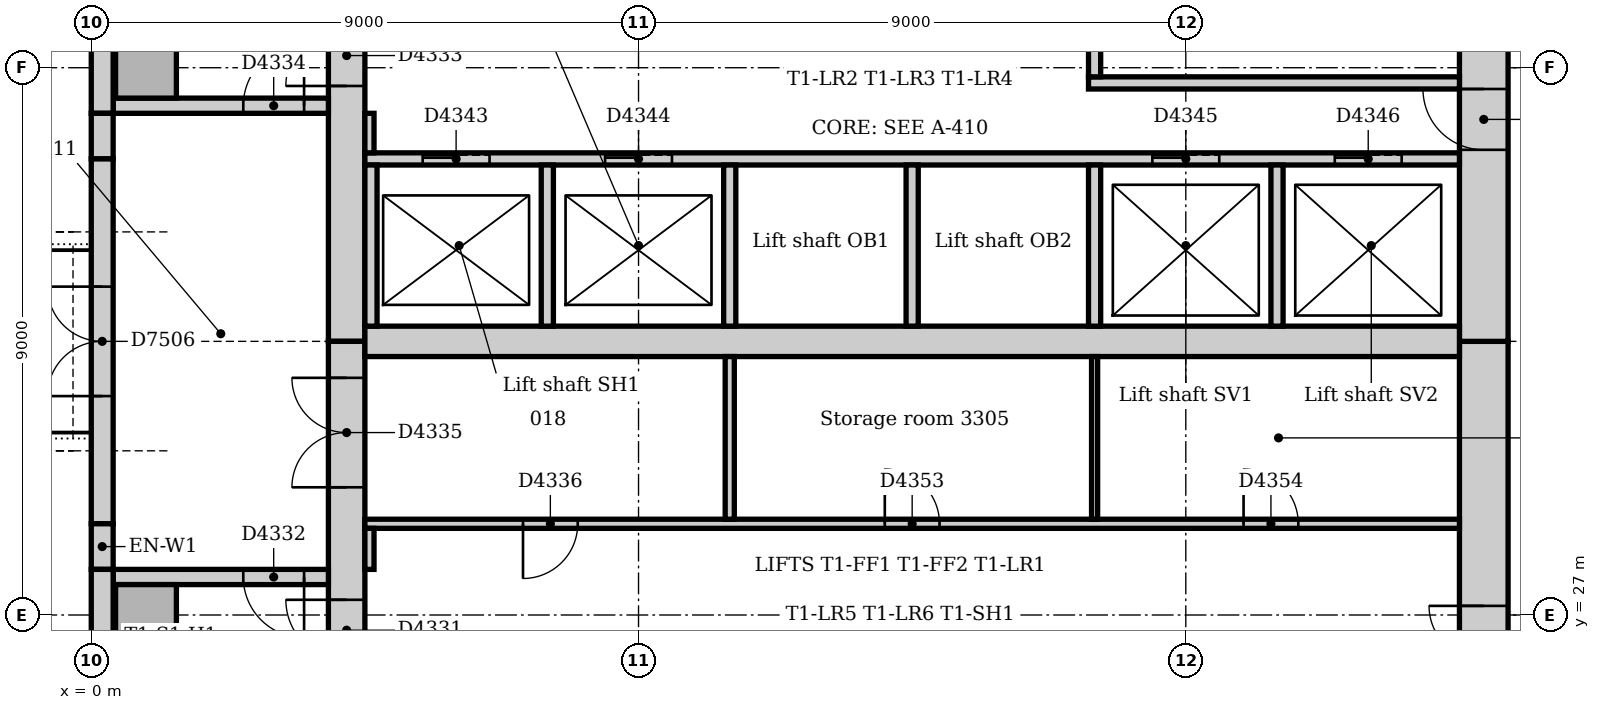
"""IFC4 building model, lengths in metres.
Left out: names, types, materials, properties, quantities, classifications, styles, units other than length and angle.
Written with IfcOpenShell. Run it as: python <this file> out.ifc"""

import sys

from ifc_helpers import new_model, si_unit, direction, frame, frame_2d, origin, origin_2d, place, context, subcontext, project, spatial, rectangle, extrude, element, fill, save


model = new_model("IFC4")
c1 = context("Model", 3, precision=1e-05, world=origin(), true_north=direction((0.0, 1.0)))
c2 = subcontext(c1, "Body", "Model", "MODEL_VIEW")
j1 = project(units=[si_unit("LENGTHUNIT", "METRE"), si_unit("PLANEANGLEUNIT", "RADIAN")], contexts=[c1])
p1 = place(None, origin())
s1 = spatial("IfcSite", under=j1, at=p1, CompositionType="ELEMENT")
p2 = place(p1, origin())
s2 = spatial("IfcBuilding", under=s1, at=p2, CompositionType="ELEMENT")
p3 = place(p2, frame((0.0, 0.0, 140.0)))
s3 = spatial("IfcBuildingStorey", under=s2, at=p3, CompositionType="ELEMENT", Elevation=140.0)
p4 = place(p3, frame((22.9, 21.0, 0.0), z_axis=(0.0, 0.0, 1.0), x_axis=(0.0, 1.0, 0.0)))
e1 = element("IfcWall", 1, at=p4, inside=s3, PredefinedType="SOLIDWALL", context=c2, shape_type="SweptSolid", body=[
    extrude(rectangle(XDim=10.5, YDim=0.8, at=frame_2d((5.25, 0.0))), origin(), (0.0, 0.0, 1.0), 4.0),
])
p5 = place(p4, frame((4.35, 0.0, 0.0)))
e2 = element("IfcOpeningElement", 2, at=p5, cuts=e1, PredefinedType="OPENING", context=c2, shape_type="SweptSolid", body=[
    extrude(rectangle(XDim=1.8, YDim=2.1, at=frame_2d((0.9, 1.05))), frame((0.0, 0.41, 0.0), z_axis=(0.0, -1.0, 0.0), x_axis=(1.0, 0.0, 0.0)), (0.0, 0.0, 1.0), 0.82),
])
p6 = place(p3, frame((22.9, 31.5, 0.0), z_axis=(0.0, 0.0, 1.0), x_axis=(0.0, 1.0, 0.0)))
e3 = element("IfcWall", 3, at=p6, inside=s3, PredefinedType="SOLIDWALL", context=c2, shape_type="SweptSolid", body=[
    extrude(rectangle(XDim=10.5, YDim=0.8, at=frame_2d((5.25, 0.0))), origin(), (0.0, 0.0, 1.0), 4.0),
])
p7 = place(p6, frame((3.15, 0.0, 0.0)))
e4 = element("IfcOpeningElement", 4, at=p7, cuts=e3, PredefinedType="OPENING", context=c2, shape_type="SweptSolid", body=[
    extrude(rectangle(XDim=1.0, YDim=2.1, at=frame_2d((0.5, 1.05))), frame((0.0, 0.41, 0.0), z_axis=(0.0, -1.0, 0.0), x_axis=(1.0, 0.0, 0.0)), (0.0, 0.0, 1.0), 0.82),
])
p8 = place(p6, frame((5.2, 0.0, 0.0)))
e5 = element("IfcOpeningElement", 5, at=p8, cuts=e3, PredefinedType="OPENING", context=c2, shape_type="SweptSolid", body=[
    extrude(rectangle(XDim=1.0, YDim=2.1, at=frame_2d((0.5, 1.05))), frame((0.0, 0.41, 0.0), z_axis=(0.0, -1.0, 0.0), x_axis=(1.0, 0.0, 0.0)), (0.0, 0.0, 1.0), 0.82),
])
p9 = place(p3, frame((4.2, 42.0, 0.0), z_axis=(0.0, 0.0, 1.0), x_axis=(0.0, -1.0, 0.0)))
e6 = element("IfcWall", 6, at=p9, inside=s3, PredefinedType="SOLIDWALL", context=c2, shape_type="SweptSolid", body=[
    extrude(rectangle(XDim=10.5, YDim=0.6, at=frame_2d((5.25, 0.0))), origin(), (0.0, 0.0, 1.0), 4.0),
])
p10 = place(p9, frame((5.3, 0.0, 0.0)))
e7 = element("IfcOpeningElement", 7, at=p10, cuts=e6, PredefinedType="OPENING", context=c2, shape_type="SweptSolid", body=[
    extrude(rectangle(XDim=1.0, YDim=2.1, at=frame_2d((0.5, 1.05))), frame((0.0, 0.31, 0.0), z_axis=(0.0, -1.0, 0.0), x_axis=(1.0, 0.0, 0.0)), (0.0, 0.0, 1.0), 0.62),
])
p11 = place(p3, frame((4.2, 31.5, 0.0), z_axis=(0.0, 0.0, 1.0), x_axis=(0.0, -1.0, 0.0)))
e8 = element("IfcWall", 8, at=p11, inside=s3, PredefinedType="SOLIDWALL", context=c2, shape_type="SweptSolid", body=[
    extrude(rectangle(XDim=10.5, YDim=0.6, at=frame_2d((5.25, 0.0))), origin(), (0.0, 0.0, 1.0), 4.0),
])
p12 = place(p11, frame((4.25, 0.0, 0.0)))
e9 = element("IfcOpeningElement", 9, at=p12, cuts=e8, PredefinedType="OPENING", context=c2, shape_type="SweptSolid", body=[
    extrude(rectangle(XDim=1.0, YDim=2.1, at=frame_2d((0.5, 1.05))), frame((0.0, 0.31, 0.0), z_axis=(0.0, -1.0, 0.0), x_axis=(1.0, 0.0, 0.0)), (0.0, 0.0, 1.0), 0.62),
])
p13 = place(p11, frame((0.6, 0.0, 0.0)))
e10 = element("IfcOpeningElement", 10, at=p13, cuts=e8, PredefinedType="OPENING", context=c2, shape_type="SweptSolid", body=[
    extrude(rectangle(XDim=1.8, YDim=2.1, at=frame_2d((0.9, 1.05))), frame((0.0, 0.31, 0.0), z_axis=(0.0, -1.0, 0.0), x_axis=(1.0, 0.0, 0.0)), (0.0, 0.0, 1.0), 0.62),
])
p14 = place(p3, frame((4.5, 31.5, 0.0), z_axis=(0.0, 0.0, 1.0), x_axis=(1.0, 0.0, 0.0)))
e11 = element("IfcWall", 11, at=p14, inside=s3, PredefinedType="SOLIDWALL", context=c2, shape_type="SweptSolid", body=[
    extrude(rectangle(XDim=18.0, YDim=0.5, at=frame_2d((9.0, 0.0))), origin(), (0.0, 0.0, 1.0), 4.0),
])
p15 = place(p3, frame((3.9, 27.625, 0.0), z_axis=(0.0, 0.0, 1.0), x_axis=(-1.0, 0.0, 0.0)))
e12 = element("IfcWall", 12, at=p15, inside=s3, PredefinedType="SOLIDWALL", context=c2, shape_type="SweptSolid", body=[
    extrude(rectangle(XDim=3.54, YDim=0.25, at=frame_2d((1.77, 0.0))), origin(), (0.0, 0.0, 1.0), 4.0),
])
p16 = place(p15, frame((0.4, 0.0, 0.0)))
e13 = element("IfcOpeningElement", 13, at=p16, cuts=e12, PredefinedType="OPENING", context=c2, shape_type="SweptSolid", body=[
    extrude(rectangle(XDim=1.0, YDim=2.1, at=frame_2d((0.5, 1.05))), frame((0.0, 0.135, 0.0), z_axis=(0.0, -1.0, 0.0), x_axis=(1.0, 0.0, 0.0)), (0.0, 0.0, 1.0), 0.27),
])
p17 = place(p3, frame((0.36, 35.375, 0.0), z_axis=(0.0, 0.0, 1.0), x_axis=(1.0, 0.0, 0.0)))
e14 = element("IfcWall", 14, at=p17, inside=s3, PredefinedType="SOLIDWALL", context=c2, shape_type="SweptSolid", body=[
    extrude(rectangle(XDim=3.54, YDim=0.25, at=frame_2d((1.77, 0.0))), origin(), (0.0, 0.0, 1.0), 4.0),
])
p18 = place(p17, frame((2.14, 0.0, 0.0)))
e15 = element("IfcOpeningElement", 15, at=p18, cuts=e14, PredefinedType="OPENING", context=c2, shape_type="SweptSolid", body=[
    extrude(rectangle(XDim=1.0, YDim=2.1, at=frame_2d((0.5, 1.05))), frame((0.0, 0.135, 0.0), z_axis=(0.0, -1.0, 0.0), x_axis=(1.0, 0.0, 0.0)), (0.0, 0.0, 1.0), 0.27),
])
for number, where, z_axis, x_axis in (
    (16, (0.9, 27.0, 0.0), (0.0, 0.0, 1.0), (1.0, 0.0, 0.0)),
    (17, (0.9, 36.0, 0.0), (0.0, 0.0, 1.0), (1.0, 0.0, 0.0)),
):
    element("IfcColumn", number, at=place(p3, frame(where, z_axis=z_axis, x_axis=x_axis)), inside=s3, PredefinedType="COLUMN", context=c2, shape_type="SweptSolid", body=[
        extrude(rectangle(XDim=1.0, YDim=1.0, at=origin_2d()), origin(), (0.0, 0.0, 1.0), 4.0),
    ])
p19 = place(p3, frame((0.18, 42.0, 0.0), z_axis=(0.0, 0.0, 1.0), x_axis=(0.0, -1.0, 0.0)))
e18 = element("IfcWall", 18, at=p19, inside=s3, PredefinedType="STANDARD", context=c2, shape_type="SweptSolid", body=[
    extrude(rectangle(XDim=6.75, YDim=0.36, at=frame_2d((3.375, 0.0))), origin(), (0.0, 0.0, 1.0), 3.7),
])
p20 = place(p3, frame((0.18, 35.25, 0.0), z_axis=(0.0, 0.0, 1.0), x_axis=(0.0, -1.0, 0.0)))
e19 = element("IfcWall", 19, at=p20, inside=s3, PredefinedType="STANDARD", context=c2, shape_type="SweptSolid", body=[
    extrude(rectangle(XDim=0.75, YDim=0.36, at=frame_2d((0.375, 0.0))), origin(), (0.0, 0.0, 1.0), 3.7),
])
p21 = place(p3, frame((0.18, 34.5, 0.0), z_axis=(0.0, 0.0, 1.0), x_axis=(0.0, -1.0, 0.0)))
e20 = element("IfcWall", 20, at=p21, inside=s3, PredefinedType="STANDARD", context=c2, shape_type="SweptSolid", body=[
    extrude(rectangle(XDim=6.0, YDim=0.36, at=frame_2d((3.0, 0.0))), origin(), (0.0, 0.0, 1.0), 3.7),
])
p22 = place(p21, frame((2.1, 0.0, 0.0)))
e21 = element("IfcOpeningElement", 21, at=p22, cuts=e20, PredefinedType="OPENING", context=c2, shape_type="SweptSolid", body=[
    extrude(rectangle(XDim=1.8, YDim=2.4, at=frame_2d((0.9, 1.2))), frame((0.0, 0.19, 0.0), z_axis=(0.0, -1.0, 0.0), x_axis=(1.0, 0.0, 0.0)), (0.0, 0.0, 1.0), 0.38),
])
p23 = place(p3, frame((0.18, 28.5, 0.0), z_axis=(0.0, 0.0, 1.0), x_axis=(0.0, -1.0, 0.0)))
e22 = element("IfcWall", 22, at=p23, inside=s3, PredefinedType="STANDARD", context=c2, shape_type="SweptSolid", body=[
    extrude(rectangle(XDim=0.75, YDim=0.36, at=frame_2d((0.375, 0.0))), origin(), (0.0, 0.0, 1.0), 3.7),
])
p24 = place(p3, frame((0.18, 27.75, 0.0), z_axis=(0.0, 0.0, 1.0), x_axis=(0.0, -1.0, 0.0)))
e23 = element("IfcWall", 23, at=p24, inside=s3, PredefinedType="STANDARD", context=c2, shape_type="SweptSolid", body=[
    extrude(rectangle(XDim=6.75, YDim=0.36, at=frame_2d((3.375, 0.0))), origin(), (0.0, 0.0, 1.0), 3.7),
])
p25 = place(p3, frame((16.4, 35.75, 0.0), z_axis=(0.0, 0.0, 1.0), x_axis=(1.0, 0.0, 0.0)))
e24 = element("IfcWall", 24, at=p25, inside=s3, PredefinedType="PARTITIONING", context=c2, shape_type="SweptSolid", body=[
    extrude(rectangle(XDim=6.1, YDim=0.2, at=frame_2d((3.05, 0.0))), origin(), (0.0, 0.0, 1.0), 3.7),
])
p26 = place(p3, frame((16.5, 35.85, 0.0), z_axis=(0.0, 0.0, 1.0), x_axis=(0.0, 1.0, 0.0)))
e25 = element("IfcWall", 25, at=p26, inside=s3, PredefinedType="PARTITIONING", context=c2, shape_type="SweptSolid", body=[
    extrude(rectangle(XDim=2.55, YDim=0.2, at=frame_2d((1.275, 0.0))), origin(), (0.0, 0.0, 1.0), 3.7),
])
p27 = place(p3, frame((4.5, 34.5, 0.0), z_axis=(0.0, 0.0, 1.0), x_axis=(1.0, 0.0, 0.0)))
e26 = element("IfcWall", 26, at=p27, inside=s3, PredefinedType="PARTITIONING", context=c2, shape_type="SweptSolid", body=[
    extrude(rectangle(XDim=18.0, YDim=0.2, at=frame_2d((9.0, 0.0))), origin(), (0.0, 0.0, 1.0), 3.7),
])
p28 = place(p27, frame((0.95, 0.0, 0.0)))
e27 = element("IfcOpeningElement", 27, at=p28, cuts=e26, PredefinedType="OPENING", context=c2, shape_type="SweptSolid", body=[
    extrude(rectangle(XDim=1.1, YDim=2.1, at=frame_2d((0.55, 1.05))), frame((0.0, 0.11, 0.0), z_axis=(0.0, -1.0, 0.0), x_axis=(1.0, 0.0, 0.0)), (0.0, 0.0, 1.0), 0.22),
])
p29 = place(p27, frame((3.95, 0.0, 0.0)))
e28 = element("IfcOpeningElement", 28, at=p29, cuts=e26, PredefinedType="OPENING", context=c2, shape_type="SweptSolid", body=[
    extrude(rectangle(XDim=1.1, YDim=2.1, at=frame_2d((0.55, 1.05))), frame((0.0, 0.11, 0.0), z_axis=(0.0, -1.0, 0.0), x_axis=(1.0, 0.0, 0.0)), (0.0, 0.0, 1.0), 0.22),
])
p30 = place(p27, frame((12.95, 0.0, 0.0)))
e29 = element("IfcOpeningElement", 29, at=p30, cuts=e26, PredefinedType="OPENING", context=c2, shape_type="SweptSolid", body=[
    extrude(rectangle(XDim=1.1, YDim=2.1, at=frame_2d((0.55, 1.05))), frame((0.0, 0.11, 0.0), z_axis=(0.0, -1.0, 0.0), x_axis=(1.0, 0.0, 0.0)), (0.0, 0.0, 1.0), 0.22),
])
p31 = place(p27, frame((15.95, 0.0, 0.0)))
e30 = element("IfcOpeningElement", 30, at=p31, cuts=e26, PredefinedType="OPENING", context=c2, shape_type="SweptSolid", body=[
    extrude(rectangle(XDim=1.1, YDim=2.1, at=frame_2d((0.55, 1.05))), frame((0.0, 0.11, 0.0), z_axis=(0.0, -1.0, 0.0), x_axis=(1.0, 0.0, 0.0)), (0.0, 0.0, 1.0), 0.22),
])
for number, where, z_axis, x_axis in (
    (31, (4.6, 31.75, 0.0), (0.0, 0.0, 1.0), (0.0, 1.0, 0.0)),
    (32, (7.5, 31.75, 0.0), (0.0, 0.0, 1.0), (0.0, 1.0, 0.0)),
    (33, (10.5, 31.75, 0.0), (0.0, 0.0, 1.0), (0.0, 1.0, 0.0)),
    (34, (13.5, 31.75, 0.0), (0.0, 0.0, 1.0), (0.0, 1.0, 0.0)),
    (35, (16.5, 31.75, 0.0), (0.0, 0.0, 1.0), (0.0, 1.0, 0.0)),
    (36, (19.5, 31.75, 0.0), (0.0, 0.0, 1.0), (0.0, 1.0, 0.0)),
):
    element("IfcWall", number, at=place(p3, frame(where, z_axis=z_axis, x_axis=x_axis)), inside=s3, PredefinedType="PARTITIONING", context=c2, shape_type="SweptSolid", body=[
        extrude(rectangle(XDim=2.65, YDim=0.2, at=frame_2d((1.325, 0.0))), origin(), (0.0, 0.0, 1.0), 3.7),
    ])
p32 = place(p3, frame((4.5, 28.5, 0.0), z_axis=(0.0, 0.0, 1.0), x_axis=(1.0, 0.0, 0.0)))
e37 = element("IfcWall", 37, at=p32, inside=s3, PredefinedType="PARTITIONING", context=c2, shape_type="SweptSolid", body=[
    extrude(rectangle(XDim=18.0, YDim=0.15, at=frame_2d((9.0, 0.0))), origin(), (0.0, 0.0, 1.0), 3.7),
])
p33 = place(p32, frame((2.6, 0.0, 0.0)))
e38 = element("IfcOpeningElement", 38, at=p33, cuts=e37, PredefinedType="OPENING", context=c2, shape_type="SweptSolid", body=[
    extrude(rectangle(XDim=0.9, YDim=2.1, at=frame_2d((0.45, 1.05))), frame((0.0, 0.085, 0.0), z_axis=(0.0, -1.0, 0.0), x_axis=(1.0, 0.0, 0.0)), (0.0, 0.0, 1.0), 0.17),
])
p34 = place(p32, frame((8.55, 0.0, 0.0)))
e39 = element("IfcOpeningElement", 39, at=p34, cuts=e37, PredefinedType="OPENING", context=c2, shape_type="SweptSolid", body=[
    extrude(rectangle(XDim=0.9, YDim=2.1, at=frame_2d((0.45, 1.05))), frame((0.0, 0.085, 0.0), z_axis=(0.0, -1.0, 0.0), x_axis=(1.0, 0.0, 0.0)), (0.0, 0.0, 1.0), 0.17),
])
p35 = place(p32, frame((14.45, 0.0, 0.0)))
e40 = element("IfcOpeningElement", 40, at=p35, cuts=e37, PredefinedType="OPENING", context=c2, shape_type="SweptSolid", body=[
    extrude(rectangle(XDim=0.9, YDim=2.1, at=frame_2d((0.45, 1.05))), frame((0.0, 0.085, 0.0), z_axis=(0.0, -1.0, 0.0), x_axis=(1.0, 0.0, 0.0)), (0.0, 0.0, 1.0), 0.17),
])
p36 = place(p3, frame((10.5, 28.575, 0.0), z_axis=(0.0, 0.0, 1.0), x_axis=(0.0, 1.0, 0.0)))
e41 = element("IfcWall", 41, at=p36, inside=s3, PredefinedType="PARTITIONING", context=c2, shape_type="SweptSolid", body=[
    extrude(rectangle(XDim=2.675, YDim=0.15, at=frame_2d((1.337, 0.0))), origin(), (0.0, 0.0, 1.0), 3.7),
])
p37 = place(p3, frame((4.575, 27.75, 0.0), z_axis=(0.0, 0.0, 1.0), x_axis=(0.0, 1.0, 0.0)))
e42 = element("IfcWall", 42, at=p37, inside=s3, PredefinedType="PARTITIONING", context=c2, shape_type="SweptSolid", body=[
    extrude(rectangle(XDim=0.675, YDim=0.15, at=frame_2d((0.338, 0.0))), origin(), (0.0, 0.0, 1.0), 3.7),
])
p38 = place(p3, frame((4.575, 34.6, 0.0), z_axis=(0.0, 0.0, 1.0), x_axis=(0.0, 1.0, 0.0)))
e43 = element("IfcWall", 43, at=p38, inside=s3, PredefinedType="PARTITIONING", context=c2, shape_type="SweptSolid", body=[
    extrude(rectangle(XDim=0.65, YDim=0.15, at=frame_2d((0.325, 0.0))), origin(), (0.0, 0.0, 1.0), 3.7),
])
p39 = place(p3, frame((16.5, 28.575, 0.0), z_axis=(0.0, 0.0, 1.0), x_axis=(0.0, 1.0, 0.0)))
e44 = element("IfcWall", 44, at=p39, inside=s3, PredefinedType="PARTITIONING", context=c2, shape_type="SweptSolid", body=[
    extrude(rectangle(XDim=2.675, YDim=0.1, at=frame_2d((1.337, 0.0))), origin(), (0.0, 0.0, 1.0), 3.7),
])
p40 = place(p22, frame((1.8, 0.0, 0.0), z_axis=(0.0, 0.0, 1.0), x_axis=(-1.0, 0.0, 0.0)))
e45 = element("IfcDoor", 45, at=p40, inside=s3, OperationType="DOUBLE_DOOR_SINGLE_SWING", PredefinedType="DOOR", context=c2, shape_type="SweptSolid", body=[
    extrude(rectangle(XDim=1.8, YDim=2.4, at=frame_2d((0.9, 1.2))), frame((0.0, -0.07, 0.0), z_axis=(0.0, -1.0, 0.0), x_axis=(1.0, 0.0, 0.0)), (0.0, 0.0, 1.0), 0.05),
])
fill(e21, e45)
p41 = place(p12, frame((1.0, 0.0, 0.0), z_axis=(0.0, 0.0, 1.0), x_axis=(-1.0, 0.0, 0.0)))
e46 = element("IfcDoor", 46, at=p41, inside=s3, OperationType="SINGLE_SWING_RIGHT", PredefinedType="DOOR", context=c2, shape_type="SweptSolid", body=[
    extrude(rectangle(XDim=1.0, YDim=2.1, at=frame_2d((0.5, 1.05))), frame((0.0, 0.025, 0.0), z_axis=(0.0, -1.0, 0.0), x_axis=(1.0, 0.0, 0.0)), (0.0, 0.0, 1.0), 0.05),
])
fill(e9, e46)
p42 = place(p16, origin())
e47 = element("IfcDoor", 47, at=p42, inside=s3, OperationType="SINGLE_SWING_LEFT", PredefinedType="DOOR", context=c2, shape_type="SweptSolid", body=[
    extrude(rectangle(XDim=1.0, YDim=2.1, at=frame_2d((0.5, 1.05))), frame((0.0, 0.025, 0.0), z_axis=(0.0, -1.0, 0.0), x_axis=(1.0, 0.0, 0.0)), (0.0, 0.0, 1.0), 0.05),
])
fill(e13, e47)
p43 = place(p10, frame((1.0, 0.0, 0.0), z_axis=(0.0, 0.0, 1.0), x_axis=(-1.0, 0.0, 0.0)))
e48 = element("IfcDoor", 48, at=p43, inside=s3, OperationType="SINGLE_SWING_LEFT", PredefinedType="DOOR", context=c2, shape_type="SweptSolid", body=[
    extrude(rectangle(XDim=1.0, YDim=2.1, at=frame_2d((0.5, 1.05))), frame((0.0, 0.025, 0.0), z_axis=(0.0, -1.0, 0.0), x_axis=(1.0, 0.0, 0.0)), (0.0, 0.0, 1.0), 0.05),
])
fill(e7, e48)
p44 = place(p18, origin())
e49 = element("IfcDoor", 49, at=p44, inside=s3, OperationType="SINGLE_SWING_RIGHT", PredefinedType="DOOR", context=c2, shape_type="SweptSolid", body=[
    extrude(rectangle(XDim=1.0, YDim=2.1, at=frame_2d((0.5, 1.05))), frame((0.0, 0.025, 0.0), z_axis=(0.0, -1.0, 0.0), x_axis=(1.0, 0.0, 0.0)), (0.0, 0.0, 1.0), 0.05),
])
fill(e15, e49)
p45 = place(p13, frame((1.8, 0.0, 0.0), z_axis=(0.0, 0.0, 1.0), x_axis=(-1.0, 0.0, 0.0)))
e50 = element("IfcDoor", 50, at=p45, inside=s3, OperationType="DOUBLE_DOOR_DOUBLE_SWING", PredefinedType="DOOR", context=c2, shape_type="SweptSolid", body=[
    extrude(rectangle(XDim=1.8, YDim=2.1, at=frame_2d((0.9, 1.05))), frame((0.0, 0.025, 0.0), z_axis=(0.0, -1.0, 0.0), x_axis=(1.0, 0.0, 0.0)), (0.0, 0.0, 1.0), 0.05),
])
fill(e10, e50)
p46 = place(p33, frame((0.9, 0.0, 0.0), z_axis=(0.0, 0.0, 1.0), x_axis=(-1.0, 0.0, 0.0)))
e51 = element("IfcDoor", 51, at=p46, inside=s3, OperationType="SINGLE_SWING_RIGHT", PredefinedType="DOOR", context=c2, shape_type="SweptSolid", body=[
    extrude(rectangle(XDim=0.9, YDim=2.1, at=frame_2d((0.45, 1.05))), frame((0.0, 0.025, 0.0), z_axis=(0.0, -1.0, 0.0), x_axis=(1.0, 0.0, 0.0)), (0.0, 0.0, 1.0), 0.05),
])
fill(e38, e51)
p47 = place(p28, origin())
e52 = element("IfcDoor", 52, at=p47, inside=s3, OperationType="SLIDING_TO_LEFT", PredefinedType="DOOR", context=c2, shape_type="SweptSolid", body=[
    extrude(rectangle(XDim=1.1, YDim=2.1, at=frame_2d((0.55, 1.05))), frame((0.0, 0.025, 0.0), z_axis=(0.0, -1.0, 0.0), x_axis=(1.0, 0.0, 0.0)), (0.0, 0.0, 1.0), 0.05),
])
fill(e27, e52)
p48 = place(p29, origin())
e53 = element("IfcDoor", 53, at=p48, inside=s3, OperationType="SLIDING_TO_LEFT", PredefinedType="DOOR", context=c2, shape_type="SweptSolid", body=[
    extrude(rectangle(XDim=1.1, YDim=2.1, at=frame_2d((0.55, 1.05))), frame((0.0, 0.025, 0.0), z_axis=(0.0, -1.0, 0.0), x_axis=(1.0, 0.0, 0.0)), (0.0, 0.0, 1.0), 0.05),
])
fill(e28, e53)
p49 = place(p30, origin())
e54 = element("IfcDoor", 54, at=p49, inside=s3, OperationType="SLIDING_TO_LEFT", PredefinedType="DOOR", context=c2, shape_type="SweptSolid", body=[
    extrude(rectangle(XDim=1.1, YDim=2.1, at=frame_2d((0.55, 1.05))), frame((0.0, 0.025, 0.0), z_axis=(0.0, -1.0, 0.0), x_axis=(1.0, 0.0, 0.0)), (0.0, 0.0, 1.0), 0.05),
])
fill(e29, e54)
p50 = place(p31, origin())
e55 = element("IfcDoor", 55, at=p50, inside=s3, OperationType="SLIDING_TO_LEFT", PredefinedType="DOOR", context=c2, shape_type="SweptSolid", body=[
    extrude(rectangle(XDim=1.1, YDim=2.1, at=frame_2d((0.55, 1.05))), frame((0.0, 0.025, 0.0), z_axis=(0.0, -1.0, 0.0), x_axis=(1.0, 0.0, 0.0)), (0.0, 0.0, 1.0), 0.05),
])
fill(e30, e55)
p51 = place(p5, origin())
e56 = element("IfcDoor", 56, at=p51, inside=s3, OperationType="DOUBLE_DOOR_DOUBLE_SWING", PredefinedType="DOOR", context=c2, shape_type="SweptSolid", body=[
    extrude(rectangle(XDim=1.8, YDim=2.1, at=frame_2d((0.9, 1.05))), frame((0.0, 0.025, 0.0), z_axis=(0.0, -1.0, 0.0), x_axis=(1.0, 0.0, 0.0)), (0.0, 0.0, 1.0), 0.05),
])
fill(e2, e56)
p52 = place(p7, origin())
e57 = element("IfcDoor", 57, at=p52, inside=s3, OperationType="SINGLE_SWING_RIGHT", PredefinedType="DOOR", context=c2, shape_type="SweptSolid", body=[
    extrude(rectangle(XDim=1.0, YDim=2.1, at=frame_2d((0.5, 1.05))), frame((0.0, 0.025, 0.0), z_axis=(0.0, -1.0, 0.0), x_axis=(1.0, 0.0, 0.0)), (0.0, 0.0, 1.0), 0.05),
])
fill(e4, e57)
p53 = place(p34, origin())
e58 = element("IfcDoor", 58, at=p53, inside=s3, OperationType="SINGLE_SWING_LEFT", PredefinedType="DOOR", context=c2, shape_type="SweptSolid", body=[
    extrude(rectangle(XDim=0.9, YDim=2.1, at=frame_2d((0.45, 1.05))), frame((0.0, 0.025, 0.0), z_axis=(0.0, -1.0, 0.0), x_axis=(1.0, 0.0, 0.0)), (0.0, 0.0, 1.0), 0.05),
])
fill(e39, e58)
p54 = place(p35, origin())
e59 = element("IfcDoor", 59, at=p54, inside=s3, OperationType="SINGLE_SWING_LEFT", PredefinedType="DOOR", context=c2, shape_type="SweptSolid", body=[
    extrude(rectangle(XDim=0.9, YDim=2.1, at=frame_2d((0.45, 1.05))), frame((0.0, 0.025, 0.0), z_axis=(0.0, -1.0, 0.0), x_axis=(1.0, 0.0, 0.0)), (0.0, 0.0, 1.0), 0.05),
])
fill(e40, e59)
save(model, sys.argv[1])
